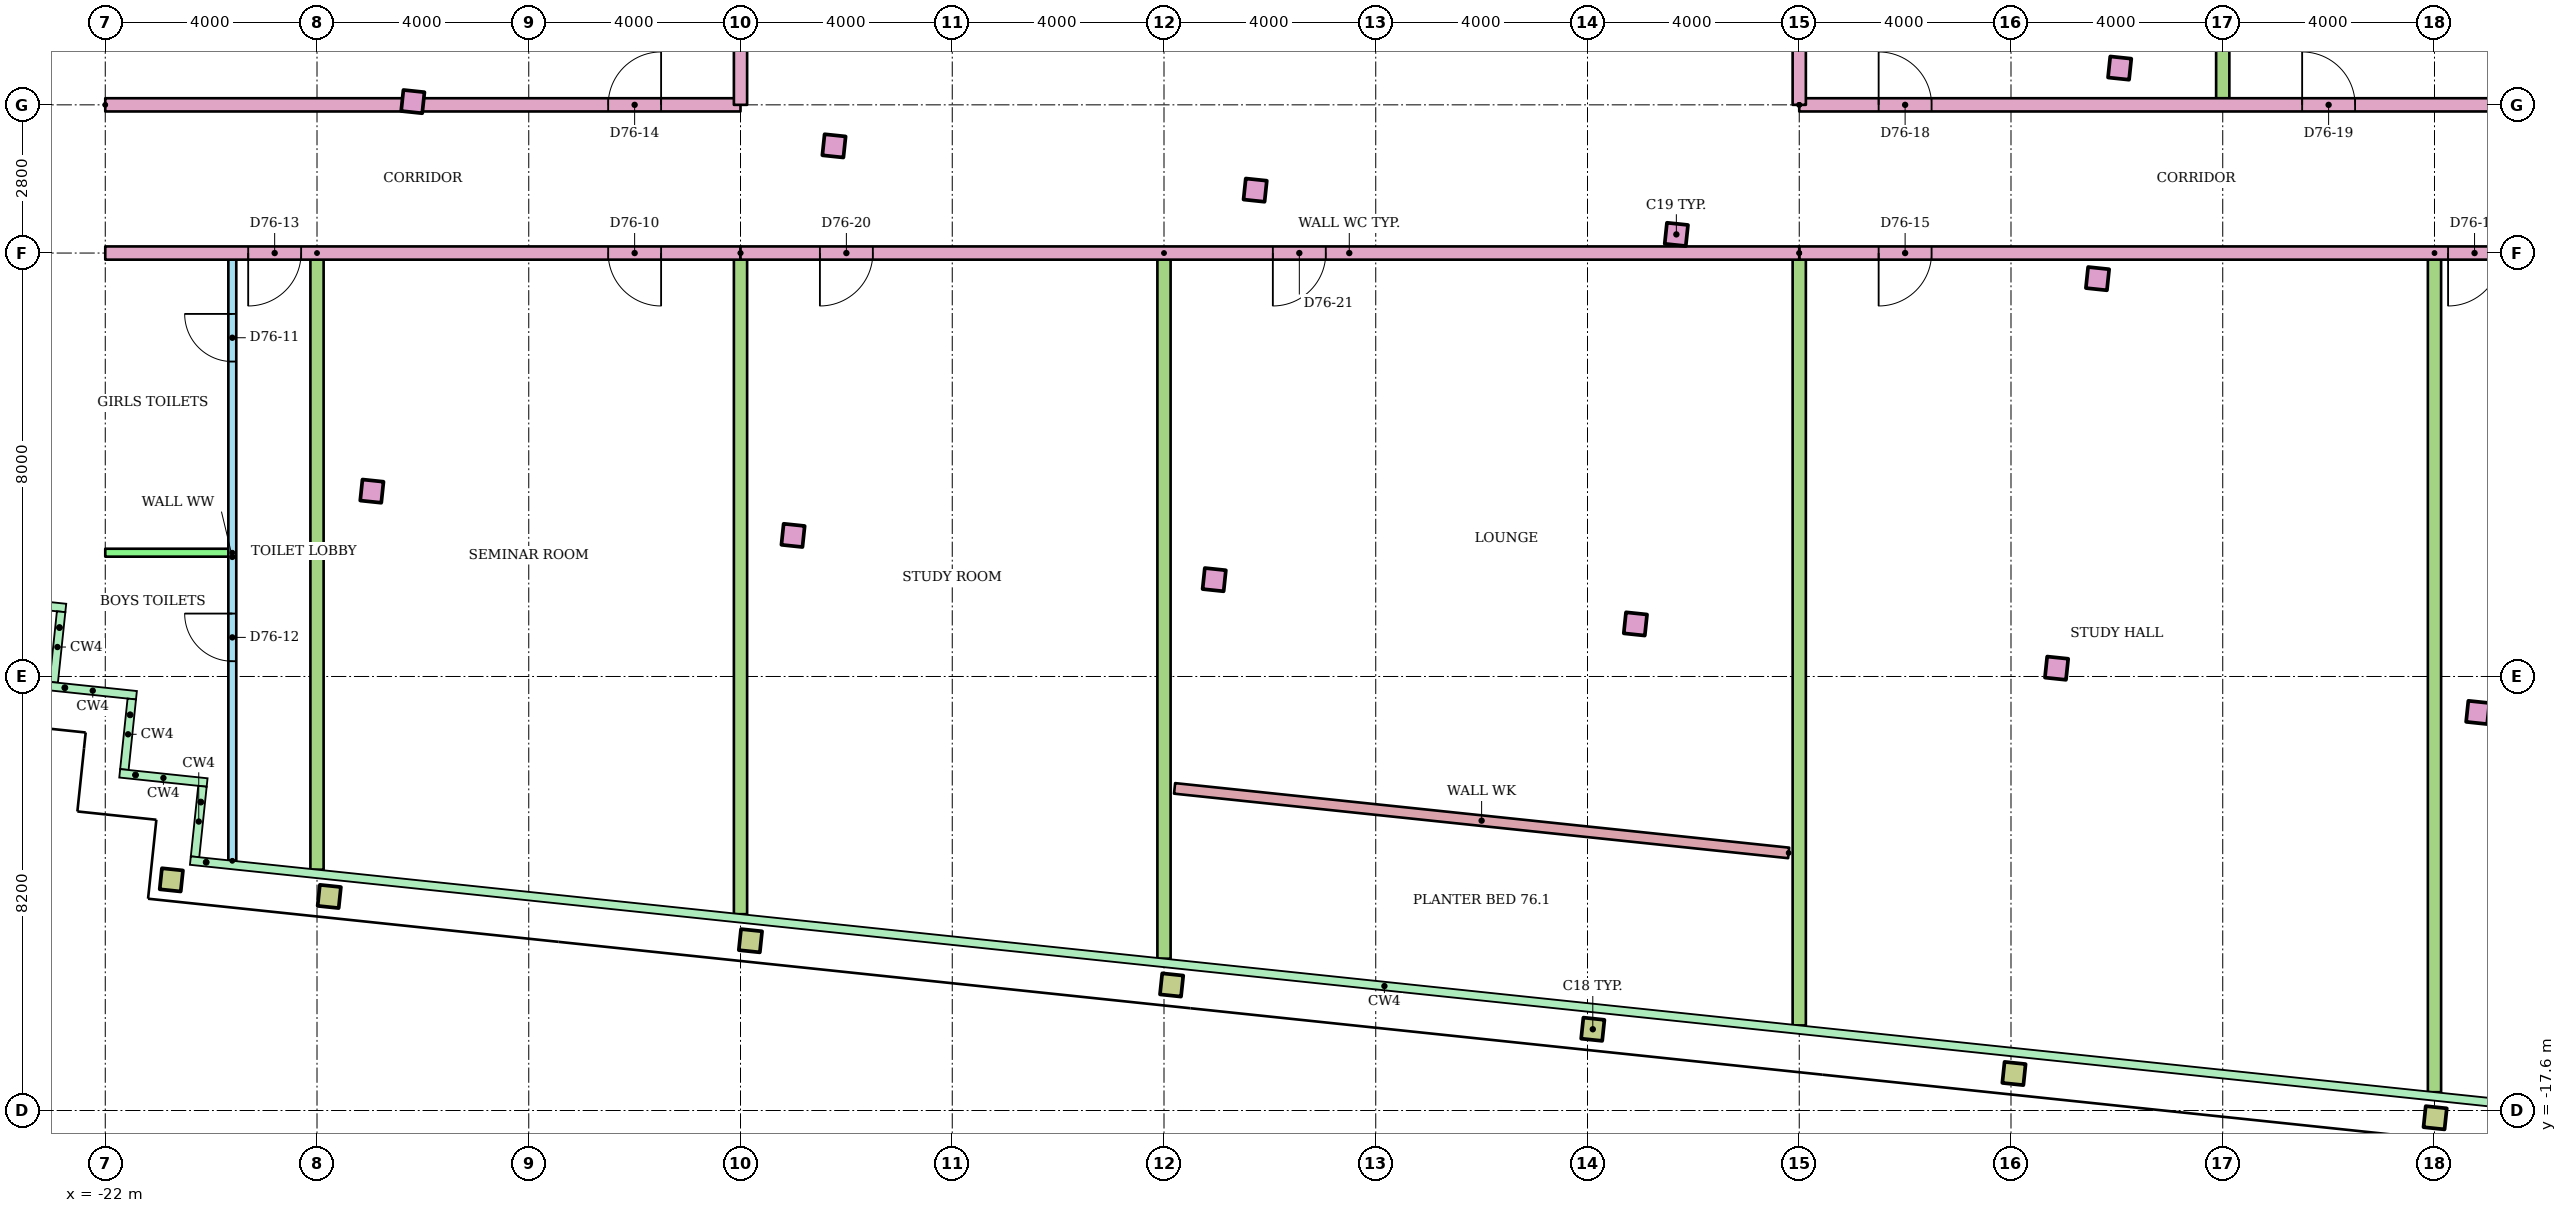
"""IFC4 building model, lengths in metres.
Left out: names, types, materials, properties, quantities, classifications, styles, units other than length and angle.
Written with IfcOpenShell. Run it as: python <this file> out.ifc"""

import sys

from ifc_helpers import new_model, si_unit, direction, frame, frame_2d, origin, origin_2d, place, context, subcontext, project, spatial, rectangle, hollow_rectangle, extrude, element, fill, save


model = new_model("IFC4")
c1 = context("Model", 3, precision=1e-05, world=origin(), true_north=direction((0.0, 1.0)))
c2 = subcontext(c1, "Body", "Model", "MODEL_VIEW")
j1 = project(units=[si_unit("LENGTHUNIT", "METRE"), si_unit("PLANEANGLEUNIT", "RADIAN")], contexts=[c1])
p1 = place(None, origin())
s1 = spatial("IfcSite", under=j1, at=p1, CompositionType="ELEMENT")
p2 = place(p1, origin())
s2 = spatial("IfcBuilding", under=s1, at=p2, CompositionType="ELEMENT")
p3 = place(p2, frame((0.0, 0.0, 294.9)))
s3 = spatial("IfcBuildingStorey", under=s2, at=p3, CompositionType="ELEMENT", Elevation=294.9)
for number, where, z_axis, x_axis in (
    (1, (-20.752, -13.243, 0.0), (0.0, 0.0, 1.0), (0.995, -0.105, 0.0)),
    (2, (-17.768, -13.556, 0.0), (0.0, 0.0, 1.0), (0.995, -0.105, 0.0)),
    (3, (-9.812, -14.392, 0.0), (0.0, 0.0, 1.0), (0.995, -0.105, 0.0)),
    (4, (-1.856, -15.229, 0.0), (0.0, 0.0, 1.0), (0.995, -0.105, 0.0)),
    (5, (6.1, -16.065, 0.0), (0.0, 0.0, 1.0), (0.995, -0.105, 0.0)),
    (6, (14.056, -16.901, 0.0), (0.0, 0.0, 1.0), (0.995, -0.105, 0.0)),
    (7, (22.012, -17.737, 0.0), (0.0, 0.0, 1.0), (0.995, -0.105, 0.0)),
):
    element("IfcColumn", number, at=place(p3, frame(where, z_axis=z_axis, x_axis=x_axis)), inside=s3, PredefinedType="COLUMN", context=c2, shape_type="SweptSolid", body=[
        extrude(hollow_rectangle(XDim=0.4, YDim=0.4, WallThickness=0.02, at=origin_2d()), origin(), (0.0, 0.0, 1.0), 3.4),
    ])
for number, where, z_axis, x_axis in (
    (8, (-16.964, -5.898, 0.0), (0.0, 0.0, 1.0), (0.995, -0.105, 0.0)),
    (9, (-9.007, -6.735, 0.0), (0.0, 0.0, 1.0), (0.995, -0.105, 0.0)),
    (10, (-1.051, -7.571, 0.0), (0.0, 0.0, 1.0), (0.995, -0.105, 0.0)),
    (11, (6.905, -8.407, 0.0), (0.0, 0.0, 1.0), (0.995, -0.105, 0.0)),
    (12, (14.861, -9.243, 0.0), (0.0, 0.0, 1.0), (0.995, -0.105, 0.0)),
    (13, (22.817, -10.08, 0.0), (0.0, 0.0, 1.0), (0.995, -0.105, 0.0)),
    (14, (-16.19, 1.461, 0.0), (0.0, 0.0, 1.0), (0.995, -0.105, 0.0)),
    (15, (-8.234, 0.625, 0.0), (0.0, 0.0, 1.0), (0.995, -0.105, 0.0)),
    (16, (-0.278, -0.211, 0.0), (0.0, 0.0, 1.0), (0.995, -0.105, 0.0)),
    (17, (7.678, -1.048, 0.0), (0.0, 0.0, 1.0), (0.995, -0.105, 0.0)),
    (18, (15.635, -1.884, 0.0), (0.0, 0.0, 1.0), (0.995, -0.105, 0.0)),
    (19, (16.053, 2.094, 0.0), (0.0, 0.0, 1.0), (0.995, -0.105, 0.0)),
):
    element("IfcColumn", number, at=place(p3, frame(where, z_axis=z_axis, x_axis=x_axis)), inside=s3, PredefinedType="COLUMN", context=c2, shape_type="SweptSolid", body=[
        extrude(rectangle(XDim=0.4, YDim=0.4, at=origin_2d()), origin(), (0.0, 0.0, 1.0), 3.4),
    ])
p4 = place(p3, frame((-10.0, -1.4, 0.0), z_axis=(0.0, 0.0, 1.0), x_axis=(-1.0, 0.0, 0.0)))
e20 = element("IfcWall", 20, at=p4, inside=s3, PredefinedType="PARTITIONING", context=c2, shape_type="SweptSolid", body=[
    extrude(rectangle(XDim=12.0, YDim=0.25, at=frame_2d((6.0, 0.0))), origin(), (0.0, 0.0, 1.0), 2.6),
])
p5 = place(p4, frame((1.5, 0.0, 0.0)))
e21 = element("IfcOpeningElement", 21, at=p5, cuts=e20, PredefinedType="OPENING", context=c2, shape_type="SweptSolid", body=[
    extrude(rectangle(XDim=1.0, YDim=2.1, at=frame_2d((0.5, 1.05))), frame((0.0, 0.135, 0.0), z_axis=(0.0, -1.0, 0.0), x_axis=(1.0, 0.0, 0.0)), (0.0, 0.0, 1.0), 0.27),
])
p6 = place(p4, frame((8.3, 0.0, 0.0)))
e22 = element("IfcOpeningElement", 22, at=p6, cuts=e20, PredefinedType="OPENING", context=c2, shape_type="SweptSolid", body=[
    extrude(rectangle(XDim=1.0, YDim=2.1, at=frame_2d((0.5, 1.05))), frame((0.0, 0.135, 0.0), z_axis=(0.0, -1.0, 0.0), x_axis=(1.0, 0.0, 0.0)), (0.0, 0.0, 1.0), 0.27),
])
p7 = place(p3, frame((-19.6, -12.882, 0.0), z_axis=(0.0, 0.0, 1.0), x_axis=(0.0, 1.0, 0.0)))
e23 = element("IfcWall", 23, at=p7, inside=s3, PredefinedType="PARTITIONING", context=c2, shape_type="SweptSolid", body=[
    extrude(rectangle(XDim=11.482, YDim=0.15, at=frame_2d((5.741, 0.0))), origin(), (0.0, 0.0, 1.0), 2.6),
])
p8 = place(p7, frame((9.432, 0.0, 0.0)))
e24 = element("IfcOpeningElement", 24, at=p8, cuts=e23, PredefinedType="OPENING", context=c2, shape_type="SweptSolid", body=[
    extrude(rectangle(XDim=0.9, YDim=2.1, at=frame_2d((0.45, 1.05))), frame((0.0, 0.085, 0.0), z_axis=(0.0, -1.0, 0.0), x_axis=(1.0, 0.0, 0.0)), (0.0, 0.0, 1.0), 0.17),
])
p9 = place(p7, frame((3.771, 0.0, 0.0)))
e25 = element("IfcOpeningElement", 25, at=p9, cuts=e23, PredefinedType="OPENING", context=c2, shape_type="SweptSolid", body=[
    extrude(rectangle(XDim=0.9, YDim=2.1, at=frame_2d((0.45, 1.05))), frame((0.0, 0.085, 0.0), z_axis=(0.0, -1.0, 0.0), x_axis=(1.0, 0.0, 0.0)), (0.0, 0.0, 1.0), 0.17),
])
p10 = place(p3, frame((-19.6, -7.061, 0.0), z_axis=(0.0, 0.0, 1.0), x_axis=(-1.0, 0.0, 0.0)))
e26 = element("IfcWall", 26, at=p10, inside=s3, PredefinedType="PARTITIONING", context=c2, shape_type="SweptSolid", body=[
    extrude(rectangle(XDim=2.4, YDim=0.15, at=frame_2d((1.2, 0.0))), origin(), (0.0, 0.0, 1.0), 2.6),
])
p11 = place(p3, frame((-18.0, -1.4, 0.0), z_axis=(0.0, 0.0, 1.0), x_axis=(0.0, -1.0, 0.0)))
e27 = element("IfcWall", 27, at=p11, inside=s3, PredefinedType="PARTITIONING", context=c2, shape_type="SweptSolid", body=[
    extrude(rectangle(XDim=11.65, YDim=0.25, at=frame_2d((5.825, 0.0))), origin(), (0.0, 0.0, 1.0), 2.6),
])
p12 = place(p3, frame((-10.0, -1.4, 0.0), z_axis=(0.0, 0.0, 1.0), x_axis=(0.0, -1.0, 0.0)))
e28 = element("IfcWall", 28, at=p12, inside=s3, PredefinedType="PARTITIONING", context=c2, shape_type="SweptSolid", body=[
    extrude(rectangle(XDim=12.491, YDim=0.25, at=frame_2d((6.246, 0.0))), origin(), (0.0, 0.0, 1.0), 2.6),
])
p13 = place(p3, frame((-22.0, 1.4, 0.0)))
e29 = element("IfcWall", 29, at=p13, inside=s3, PredefinedType="PARTITIONING", context=c2, shape_type="SweptSolid", body=[
    extrude(rectangle(XDim=12.0, YDim=0.25, at=frame_2d((6.0, 0.0))), origin(), (0.0, 0.0, 1.0), 2.6),
])
p14 = place(p13, frame((9.5, 0.0, 0.0)))
e30 = element("IfcOpeningElement", 30, at=p14, cuts=e29, PredefinedType="OPENING", context=c2, shape_type="SweptSolid", body=[
    extrude(rectangle(XDim=1.0, YDim=2.1, at=frame_2d((0.5, 1.05))), frame((0.0, 0.135, 0.0), z_axis=(0.0, -1.0, 0.0), x_axis=(1.0, 0.0, 0.0)), (0.0, 0.0, 1.0), 0.27),
])
p15 = place(p3, frame((25.0, -1.4, 0.0), z_axis=(0.0, 0.0, 1.0), x_axis=(-1.0, 0.0, 0.0)))
e31 = element("IfcWall", 31, at=p15, inside=s3, PredefinedType="PARTITIONING", context=c2, shape_type="SweptSolid", body=[
    extrude(rectangle(XDim=15.0, YDim=0.25, at=frame_2d((7.5, 0.0))), origin(), (0.0, 0.0, 1.0), 2.6),
])
p16 = place(p15, frame((12.5, 0.0, 0.0)))
e32 = element("IfcOpeningElement", 32, at=p16, cuts=e31, PredefinedType="OPENING", context=c2, shape_type="SweptSolid", body=[
    extrude(rectangle(XDim=1.0, YDim=2.1, at=frame_2d((0.5, 1.05))), frame((0.0, 0.135, 0.0), z_axis=(0.0, -1.0, 0.0), x_axis=(1.0, 0.0, 0.0)), (0.0, 0.0, 1.0), 0.27),
])
p17 = place(p15, frame((1.743, 0.0, 0.0)))
e33 = element("IfcOpeningElement", 33, at=p17, cuts=e31, PredefinedType="OPENING", context=c2, shape_type="SweptSolid", body=[
    extrude(rectangle(XDim=1.0, YDim=2.1, at=frame_2d((0.5, 1.05))), frame((0.0, 0.135, 0.0), z_axis=(0.0, -1.0, 0.0), x_axis=(1.0, 0.0, 0.0)), (0.0, 0.0, 1.0), 0.27),
])
p18 = place(p3, frame((10.0, -1.4, 0.0), z_axis=(0.0, 0.0, 1.0), x_axis=(0.0, -1.0, 0.0)))
e34 = element("IfcWall", 34, at=p18, inside=s3, PredefinedType="PARTITIONING", context=c2, shape_type="SweptSolid", body=[
    extrude(rectangle(XDim=14.593, YDim=0.25, at=frame_2d((7.297, 0.0))), origin(), (0.0, 0.0, 1.0), 2.6),
])
p19 = place(p3, frame((22.0, -1.4, 0.0), z_axis=(0.0, 0.0, 1.0), x_axis=(0.0, -1.0, 0.0)))
e35 = element("IfcWall", 35, at=p19, inside=s3, PredefinedType="PARTITIONING", context=c2, shape_type="SweptSolid", body=[
    extrude(rectangle(XDim=15.854, YDim=0.25, at=frame_2d((7.927, 0.0))), origin(), (0.0, 0.0, 1.0), 2.6),
])
p20 = place(p3, frame((10.0, 1.4, 0.0)))
e36 = element("IfcWall", 36, at=p20, inside=s3, PredefinedType="PARTITIONING", context=c2, shape_type="SweptSolid", body=[
    extrude(rectangle(XDim=15.0, YDim=0.25, at=frame_2d((7.5, 0.0))), origin(), (0.0, 0.0, 1.0), 2.6),
])
p21 = place(p20, frame((1.5, 0.0, 0.0)))
e37 = element("IfcOpeningElement", 37, at=p21, cuts=e36, PredefinedType="OPENING", context=c2, shape_type="SweptSolid", body=[
    extrude(rectangle(XDim=1.0, YDim=2.1, at=frame_2d((0.5, 1.05))), frame((0.0, 0.135, 0.0), z_axis=(0.0, -1.0, 0.0), x_axis=(1.0, 0.0, 0.0)), (0.0, 0.0, 1.0), 0.27),
])
p22 = place(p20, frame((9.5, 0.0, 0.0)))
e38 = element("IfcOpeningElement", 38, at=p22, cuts=e36, PredefinedType="OPENING", context=c2, shape_type="SweptSolid", body=[
    extrude(rectangle(XDim=1.0, YDim=2.1, at=frame_2d((0.5, 1.05))), frame((0.0, 0.135, 0.0), z_axis=(0.0, -1.0, 0.0), x_axis=(1.0, 0.0, 0.0)), (0.0, 0.0, 1.0), 0.27),
])
p23 = place(p3, frame((18.0, 19.004, 0.0), z_axis=(0.0, 0.0, 1.0), x_axis=(0.0, -1.0, 0.0)))
e39 = element("IfcWall", 39, at=p23, inside=s3, PredefinedType="PARTITIONING", context=c2, shape_type="SweptSolid", body=[
    extrude(rectangle(XDim=17.604, YDim=0.25, at=frame_2d((8.802, 0.0))), origin(), (0.0, 0.0, 1.0), 2.6),
])
p24 = place(p3, frame((-2.0, -1.4, 0.0), z_axis=(0.0, 0.0, 1.0), x_axis=(0.0, -1.0, 0.0)))
e40 = element("IfcWall", 40, at=p24, inside=s3, PredefinedType="PARTITIONING", context=c2, shape_type="SweptSolid", body=[
    extrude(rectangle(XDim=13.332, YDim=0.25, at=frame_2d((6.666, 0.0))), origin(), (0.0, 0.0, 1.0), 2.6),
])
p25 = place(p3, frame((10.0, -1.4, 0.0), z_axis=(0.0, 0.0, 1.0), x_axis=(-1.0, 0.0, 0.0)))
e41 = element("IfcWall", 41, at=p25, inside=s3, PredefinedType="PARTITIONING", context=c2, shape_type="SweptSolid", body=[
    extrude(rectangle(XDim=20.0, YDim=0.25, at=frame_2d((10.0, 0.0))), origin(), (0.0, 0.0, 1.0), 2.6),
])
p26 = place(p25, frame((17.5, 0.0, 0.0)))
e42 = element("IfcOpeningElement", 42, at=p26, cuts=e41, PredefinedType="OPENING", context=c2, shape_type="SweptSolid", body=[
    extrude(rectangle(XDim=1.0, YDim=2.1, at=frame_2d((0.5, 1.05))), frame((0.0, 0.135, 0.0), z_axis=(0.0, -1.0, 0.0), x_axis=(1.0, 0.0, 0.0)), (0.0, 0.0, 1.0), 0.27),
])
p27 = place(p25, frame((8.944, 0.0, 0.0)))
e43 = element("IfcOpeningElement", 43, at=p27, cuts=e41, PredefinedType="OPENING", context=c2, shape_type="SweptSolid", body=[
    extrude(rectangle(XDim=1.0, YDim=2.1, at=frame_2d((0.5, 1.05))), frame((0.0, 0.135, 0.0), z_axis=(0.0, -1.0, 0.0), x_axis=(1.0, 0.0, 0.0)), (0.0, 0.0, 1.0), 0.27),
])
for number, where, z_axis, x_axis in (
    (44, (-10.0, 3.0, 0.0), (0.0, 0.0, 1.0), (0.0, -1.0, 0.0)),
    (45, (10.0, 1.4, 0.0), (0.0, 0.0, 1.0), (0.0, 1.0, 0.0)),
):
    element("IfcWall", number, at=place(p3, frame(where, z_axis=z_axis, x_axis=x_axis)), inside=s3, PredefinedType="PARTITIONING", context=c2, shape_type="SweptSolid", body=[
        extrude(rectangle(XDim=1.6, YDim=0.25, at=frame_2d((0.8, 0.0))), origin(), (0.0, 0.0, 1.0), 2.6),
    ])
p28 = place(p3, frame((9.8, -12.733, 0.0), z_axis=(0.0, 0.0, 1.0), x_axis=(-0.994521727026, 0.104530064923, 0.0)))
e46 = element("IfcWall", 46, at=p28, inside=s3, PredefinedType="PARTITIONING", context=c2, shape_type="SweptSolid", body=[
    extrude(rectangle(XDim=11.664, YDim=0.2, at=frame_2d((5.832, 0.0))), origin(), (0.0, 0.0, 1.0), 0.9),
])
p29 = place(p5, origin())
e47 = element("IfcDoor", 47, at=p29, inside=s3, OperationType="SINGLE_SWING_LEFT", PredefinedType="DOOR", context=c2, shape_type="SweptSolid", body=[
    extrude(rectangle(XDim=1.0, YDim=2.1, at=frame_2d((0.5, 1.05))), frame((0.0, 0.025, 0.0), z_axis=(0.0, -1.0, 0.0), x_axis=(1.0, 0.0, 0.0)), (0.0, 0.0, 1.0), 0.05),
])
fill(e21, e47)
p30 = place(p8, origin())
e48 = element("IfcDoor", 48, at=p30, inside=s3, OperationType="SINGLE_SWING_RIGHT", PredefinedType="DOOR", context=c2, shape_type="SweptSolid", body=[
    extrude(rectangle(XDim=0.9, YDim=2.1, at=frame_2d((0.45, 1.05))), frame((0.0, 0.025, 0.0), z_axis=(0.0, -1.0, 0.0), x_axis=(1.0, 0.0, 0.0)), (0.0, 0.0, 1.0), 0.05),
])
fill(e24, e48)
p31 = place(p9, origin())
e49 = element("IfcDoor", 49, at=p31, inside=s3, OperationType="SINGLE_SWING_RIGHT", PredefinedType="DOOR", context=c2, shape_type="SweptSolid", body=[
    extrude(rectangle(XDim=0.9, YDim=2.1, at=frame_2d((0.45, 1.05))), frame((0.0, 0.025, 0.0), z_axis=(0.0, -1.0, 0.0), x_axis=(1.0, 0.0, 0.0)), (0.0, 0.0, 1.0), 0.05),
])
fill(e25, e49)
p32 = place(p6, origin())
e50 = element("IfcDoor", 50, at=p32, inside=s3, OperationType="SINGLE_SWING_RIGHT", PredefinedType="DOOR", context=c2, shape_type="SweptSolid", body=[
    extrude(rectangle(XDim=1.0, YDim=2.1, at=frame_2d((0.5, 1.05))), frame((0.0, 0.025, 0.0), z_axis=(0.0, -1.0, 0.0), x_axis=(1.0, 0.0, 0.0)), (0.0, 0.0, 1.0), 0.05),
])
fill(e22, e50)
p33 = place(p14, origin())
e51 = element("IfcDoor", 51, at=p33, inside=s3, OperationType="SINGLE_SWING_RIGHT", PredefinedType="DOOR", context=c2, shape_type="SweptSolid", body=[
    extrude(rectangle(XDim=1.0, YDim=2.1, at=frame_2d((0.5, 1.05))), frame((0.0, 0.025, 0.0), z_axis=(0.0, -1.0, 0.0), x_axis=(1.0, 0.0, 0.0)), (0.0, 0.0, 1.0), 0.05),
])
fill(e30, e51)
p34 = place(p16, origin())
e52 = element("IfcDoor", 52, at=p34, inside=s3, OperationType="SINGLE_SWING_RIGHT", PredefinedType="DOOR", context=c2, shape_type="SweptSolid", body=[
    extrude(rectangle(XDim=1.0, YDim=2.1, at=frame_2d((0.5, 1.05))), frame((0.0, 0.025, 0.0), z_axis=(0.0, -1.0, 0.0), x_axis=(1.0, 0.0, 0.0)), (0.0, 0.0, 1.0), 0.05),
])
fill(e32, e52)
p35 = place(p17, origin())
e53 = element("IfcDoor", 53, at=p35, inside=s3, OperationType="SINGLE_SWING_RIGHT", PredefinedType="DOOR", context=c2, shape_type="SweptSolid", body=[
    extrude(rectangle(XDim=1.0, YDim=2.1, at=frame_2d((0.5, 1.05))), frame((0.0, 0.025, 0.0), z_axis=(0.0, -1.0, 0.0), x_axis=(1.0, 0.0, 0.0)), (0.0, 0.0, 1.0), 0.05),
])
fill(e33, e53)
p36 = place(p21, origin())
e54 = element("IfcDoor", 54, at=p36, inside=s3, OperationType="SINGLE_SWING_LEFT", PredefinedType="DOOR", context=c2, shape_type="SweptSolid", body=[
    extrude(rectangle(XDim=1.0, YDim=2.1, at=frame_2d((0.5, 1.05))), frame((0.0, 0.025, 0.0), z_axis=(0.0, -1.0, 0.0), x_axis=(1.0, 0.0, 0.0)), (0.0, 0.0, 1.0), 0.05),
])
fill(e37, e54)
p37 = place(p22, origin())
e55 = element("IfcDoor", 55, at=p37, inside=s3, OperationType="SINGLE_SWING_LEFT", PredefinedType="DOOR", context=c2, shape_type="SweptSolid", body=[
    extrude(rectangle(XDim=1.0, YDim=2.1, at=frame_2d((0.5, 1.05))), frame((0.0, 0.025, 0.0), z_axis=(0.0, -1.0, 0.0), x_axis=(1.0, 0.0, 0.0)), (0.0, 0.0, 1.0), 0.05),
])
fill(e38, e55)
p38 = place(p26, origin())
e56 = element("IfcDoor", 56, at=p38, inside=s3, OperationType="SINGLE_SWING_RIGHT", PredefinedType="DOOR", context=c2, shape_type="SweptSolid", body=[
    extrude(rectangle(XDim=1.0, YDim=2.1, at=frame_2d((0.5, 1.05))), frame((0.0, 0.025, 0.0), z_axis=(0.0, -1.0, 0.0), x_axis=(1.0, 0.0, 0.0)), (0.0, 0.0, 1.0), 0.05),
])
fill(e42, e56)
p39 = place(p27, origin())
e57 = element("IfcDoor", 57, at=p39, inside=s3, OperationType="SINGLE_SWING_RIGHT", PredefinedType="DOOR", context=c2, shape_type="SweptSolid", body=[
    extrude(rectangle(XDim=1.0, YDim=2.1, at=frame_2d((0.5, 1.05))), frame((0.0, 0.025, 0.0), z_axis=(0.0, -1.0, 0.0), x_axis=(1.0, 0.0, 0.0)), (0.0, 0.0, 1.0), 0.05),
])
fill(e43, e57)
save(model, sys.argv[1])
